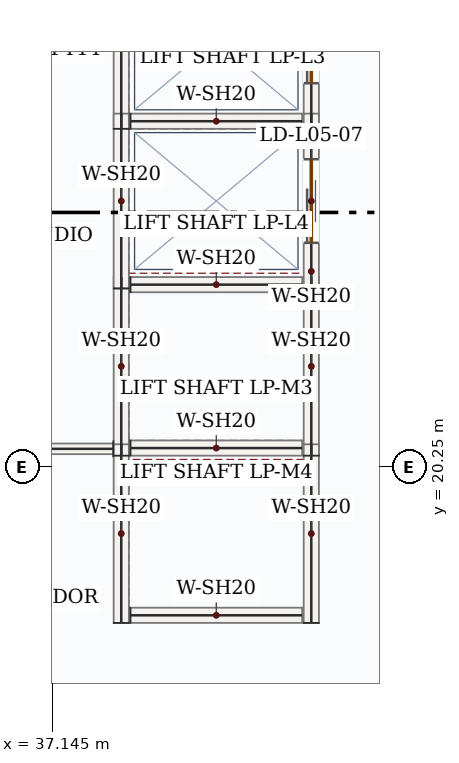
"""IFC4 building model, lengths in metres.
Left out: names, types, materials, properties, quantities, classifications, styles, units other than length and angle.
Written with IfcOpenShell. Run it as: python <this file> out.ifc"""

import sys

from ifc_helpers import new_model, si_unit, direction, frame, frame_2d, origin, place, context, subcontext, project, spatial, rectangle, extrude, source, transform, mapped, element, fill, save


model = new_model("IFC4")
c1 = context("Model", 3, precision=1e-05, world=origin(), true_north=direction((0.0, 1.0)))
c2 = subcontext(c1, "Body", "Model", "MODEL_VIEW")
j1 = project(units=[si_unit("LENGTHUNIT", "METRE"), si_unit("PLANEANGLEUNIT", "RADIAN")], contexts=[c1])
p1 = place(None, origin())
s1 = spatial("IfcSite", under=j1, at=p1, CompositionType="ELEMENT")
p2 = place(p1, origin())
s2 = spatial("IfcBuilding", under=s1, at=p2, CompositionType="ELEMENT")
p3 = place(p2, frame((0.0, 0.0, 29.1)))
s3 = spatial("IfcBuildingStorey", under=s2, at=p3, CompositionType="ELEMENT", Elevation=29.1)
m1 = source(origin(), c2, "Body", "SweptSolid", [
    extrude(rectangle(XDim=2.35, YDim=0.2, at=frame_2d((1.175, 0.0))), origin(), (0.0, 0.0, 1.0), 3.95),
])
for number, where, z_axis, x_axis in (
    (1, (38.05, 20.4, 0.0), (0.0, 0.0, 1.0), (0.0, 1.0, 0.0)),
    (2, (40.55, 20.4, 0.0), (0.0, 0.0, 1.0), (0.0, 1.0, 0.0)),
):
    element("IfcWall", number, at=place(p3, frame(where, z_axis=z_axis, x_axis=x_axis)), inside=s3, PredefinedType="SOLIDWALL", context=c2, shape_type="MappedRepresentation", body=[
        mapped(m1, transform((0.0, 0.0, 0.0), x_axis=(1.0, 0.0, 0.0), y_axis=(0.0, 1.0, 0.0), z_axis=(0.0, 0.0, 1.0), scale=1.0)),
    ])
m2 = source(origin(), c2, "Body", "SweptSolid", [
    extrude(rectangle(XDim=2.26, YDim=0.2, at=frame_2d((1.13, 0.0))), origin(), (0.0, 0.0, 1.0), 3.95),
])
for number, where, z_axis, x_axis in (
    (3, (38.17, 20.5, 0.0), (0.0, 0.0, 1.0), (1.0, 0.0, 0.0)),
    (4, (38.17, 22.65, 0.0), (0.0, 0.0, 1.0), (1.0, 0.0, 0.0)),
):
    element("IfcWall", number, at=place(p3, frame(where, z_axis=z_axis, x_axis=x_axis)), inside=s3, PredefinedType="SOLIDWALL", context=c2, shape_type="MappedRepresentation", body=[
        mapped(m2, transform((0.0, 0.0, 0.0), x_axis=(1.0, 0.0, 0.0), y_axis=(0.0, 1.0, 0.0), z_axis=(0.0, 0.0, 1.0), scale=1.0)),
    ])
for number, where, z_axis, x_axis in (
    (5, (38.05, 18.2, 0.0), (0.0, 0.0, 1.0), (0.0, 1.0, 0.0)),
    (6, (40.55, 18.2, 0.0), (0.0, 0.0, 1.0), (0.0, 1.0, 0.0)),
):
    element("IfcWall", number, at=place(p3, frame(where, z_axis=z_axis, x_axis=x_axis)), inside=s3, PredefinedType="SOLIDWALL", context=c2, shape_type="MappedRepresentation", body=[
        mapped(m1, transform((0.0, 0.0, 0.0), x_axis=(1.0, 0.0, 0.0), y_axis=(0.0, 1.0, 0.0), z_axis=(0.0, 0.0, 1.0), scale=1.0)),
    ])
p4 = place(p3, frame((38.17, 18.3, 0.0), z_axis=(0.0, 0.0, 1.0), x_axis=(1.0, 0.0, 0.0)))
e7 = element("IfcWall", 7, at=p4, inside=s3, PredefinedType="SOLIDWALL", context=c2, shape_type="MappedRepresentation", body=[
    mapped(m2, transform((0.0, 0.0, 0.0), x_axis=(1.0, 0.0, 0.0), y_axis=(0.0, 1.0, 0.0), z_axis=(0.0, 0.0, 1.0), scale=1.0)),
])
m3 = source(origin(), c2, "Body", "SweptSolid", [
    extrude(rectangle(XDim=2.3, YDim=0.2, at=frame_2d((1.15, 0.0))), origin(), (0.0, 0.0, 1.0), 3.95),
])
p5 = place(p3, frame((38.05, 24.7, 0.0), z_axis=(0.0, 0.0, 1.0), x_axis=(0.0, 1.0, 0.0)))
e8 = element("IfcWall", 8, at=p5, inside=s3, PredefinedType="SOLIDWALL", context=c2, shape_type="MappedRepresentation", body=[
    mapped(m3, transform((0.0, 0.0, 0.0), x_axis=(1.0, 0.0, 0.0), y_axis=(0.0, 1.0, 0.0), z_axis=(0.0, 0.0, 1.0), scale=1.0)),
])
p6 = place(p3, frame((40.55, 24.7, 0.0), z_axis=(0.0, 0.0, 1.0), x_axis=(0.0, 1.0, 0.0)))
e9 = element("IfcWall", 9, at=p6, inside=s3, PredefinedType="SOLIDWALL", context=c2, shape_type="SweptSolid", body=[
    extrude(rectangle(XDim=2.3, YDim=0.2, at=frame_2d((1.15, 0.0))), origin(), (0.0, 0.0, 1.0), 3.95),
])
p7 = place(p6, frame((0.6, 0.0, 0.0)))
e10 = element("IfcOpeningElement", 10, at=p7, cuts=e9, PredefinedType="OPENING", context=c2, shape_type="SweptSolid", body=[
    extrude(rectangle(XDim=1.1, YDim=2.15, at=frame_2d((0.55, 1.075))), frame((0.0, 0.11, 0.0), z_axis=(0.0, -1.0, 0.0), x_axis=(1.0, 0.0, 0.0)), (0.0, 0.0, 1.0), 0.22),
])
p8 = place(p3, frame((38.17, 24.8, 0.0), z_axis=(0.0, 0.0, 1.0), x_axis=(1.0, 0.0, 0.0)))
e11 = element("IfcWall", 11, at=p8, inside=s3, PredefinedType="SOLIDWALL", context=c2, shape_type="MappedRepresentation", body=[
    mapped(m2, transform((0.0, 0.0, 0.0), x_axis=(1.0, 0.0, 0.0), y_axis=(0.0, 1.0, 0.0), z_axis=(0.0, 0.0, 1.0), scale=1.0)),
])
m4 = source(origin(), c2, "Body", "SweptSolid", [
    extrude(rectangle(XDim=2.3, YDim=0.2, at=frame_2d((1.15, 0.0))), origin(), (0.0, 0.0, 1.0), 3.95),
])
p9 = place(p3, frame((38.05, 22.6, 0.0), z_axis=(0.0, 0.0, 1.0), x_axis=(0.0, 1.0, 0.0)))
e12 = element("IfcWall", 12, at=p9, inside=s3, PredefinedType="SOLIDWALL", context=c2, shape_type="MappedRepresentation", body=[
    mapped(m4, transform((0.0, 0.0, 0.0), x_axis=(1.0, 0.0, 0.0), y_axis=(0.0, 1.0, 0.0), z_axis=(0.0, 0.0, 1.0), scale=1.0)),
])
p10 = place(p3, frame((40.55, 22.6, 0.0), z_axis=(0.0, 0.0, 1.0), x_axis=(0.0, 1.0, 0.0)))
e13 = element("IfcWall", 13, at=p10, inside=s3, PredefinedType="SOLIDWALL", context=c2, shape_type="SweptSolid", body=[
    extrude(rectangle(XDim=2.3, YDim=0.2, at=frame_2d((1.15, 0.0))), origin(), (0.0, 0.0, 1.0), 3.95),
])
p11 = place(p10, frame((0.6, 0.0, 0.0)))
e14 = element("IfcOpeningElement", 14, at=p11, cuts=e13, PredefinedType="OPENING", context=c2, shape_type="SweptSolid", body=[
    extrude(rectangle(XDim=1.1, YDim=2.15, at=frame_2d((0.55, 1.075))), frame((0.0, 0.11, 0.0), z_axis=(0.0, -1.0, 0.0), x_axis=(1.0, 0.0, 0.0)), (0.0, 0.0, 1.0), 0.22),
])
m5 = source(origin(), c2, "Body", "SweptSolid", [
    extrude(rectangle(XDim=3.89, YDim=0.14, at=frame_2d((1.945, 0.0))), origin(), (0.0, 0.0, 1.0), 3.95),
])
p12 = place(p3, frame((37.945, 20.49, 0.0), z_axis=(0.0, 0.0, 1.0), x_axis=(-1.0, 0.0, 0.0)))
e15 = element("IfcWall", 15, at=p12, inside=s3, PredefinedType="PARTITIONING", context=c2, shape_type="MappedRepresentation", body=[
    mapped(m5, transform((0.0, 0.0, 0.0), x_axis=(1.0, 0.0, 0.0), y_axis=(0.0, 1.0, 0.0), z_axis=(0.0, 0.0, 1.0), scale=1.0)),
])
m6 = source(origin(), c2, "Body", "SweptSolid", [
    extrude(rectangle(XDim=1.1, YDim=2.15, at=frame_2d((0.55, 1.075))), frame((0.0, 0.025, 0.0), z_axis=(0.0, -1.0, 0.0), x_axis=(1.0, 0.0, 0.0)), (0.0, 0.0, 1.0), 0.05),
])
p13 = place(p7, origin())
e16 = element("IfcDoor", 16, at=p13, inside=s3, OperationType="DOUBLE_DOOR_SLIDING", PredefinedType="DOOR", context=c2, shape_type="MappedRepresentation", body=[
    mapped(m6, transform((0.0, 0.0, 0.0), x_axis=(1.0, 0.0, 0.0), y_axis=(0.0, 1.0, 0.0), z_axis=(0.0, 0.0, 1.0), scale=1.0)),
])
fill(e10, e16)
p14 = place(p11, origin())
e17 = element("IfcDoor", 17, at=p14, inside=s3, OperationType="DOUBLE_DOOR_SLIDING", PredefinedType="DOOR", context=c2, shape_type="MappedRepresentation", body=[
    mapped(m6, transform((0.0, 0.0, 0.0), x_axis=(1.0, 0.0, 0.0), y_axis=(0.0, 1.0, 0.0), z_axis=(0.0, 0.0, 1.0), scale=1.0)),
])
fill(e14, e17)
save(model, sys.argv[1])
